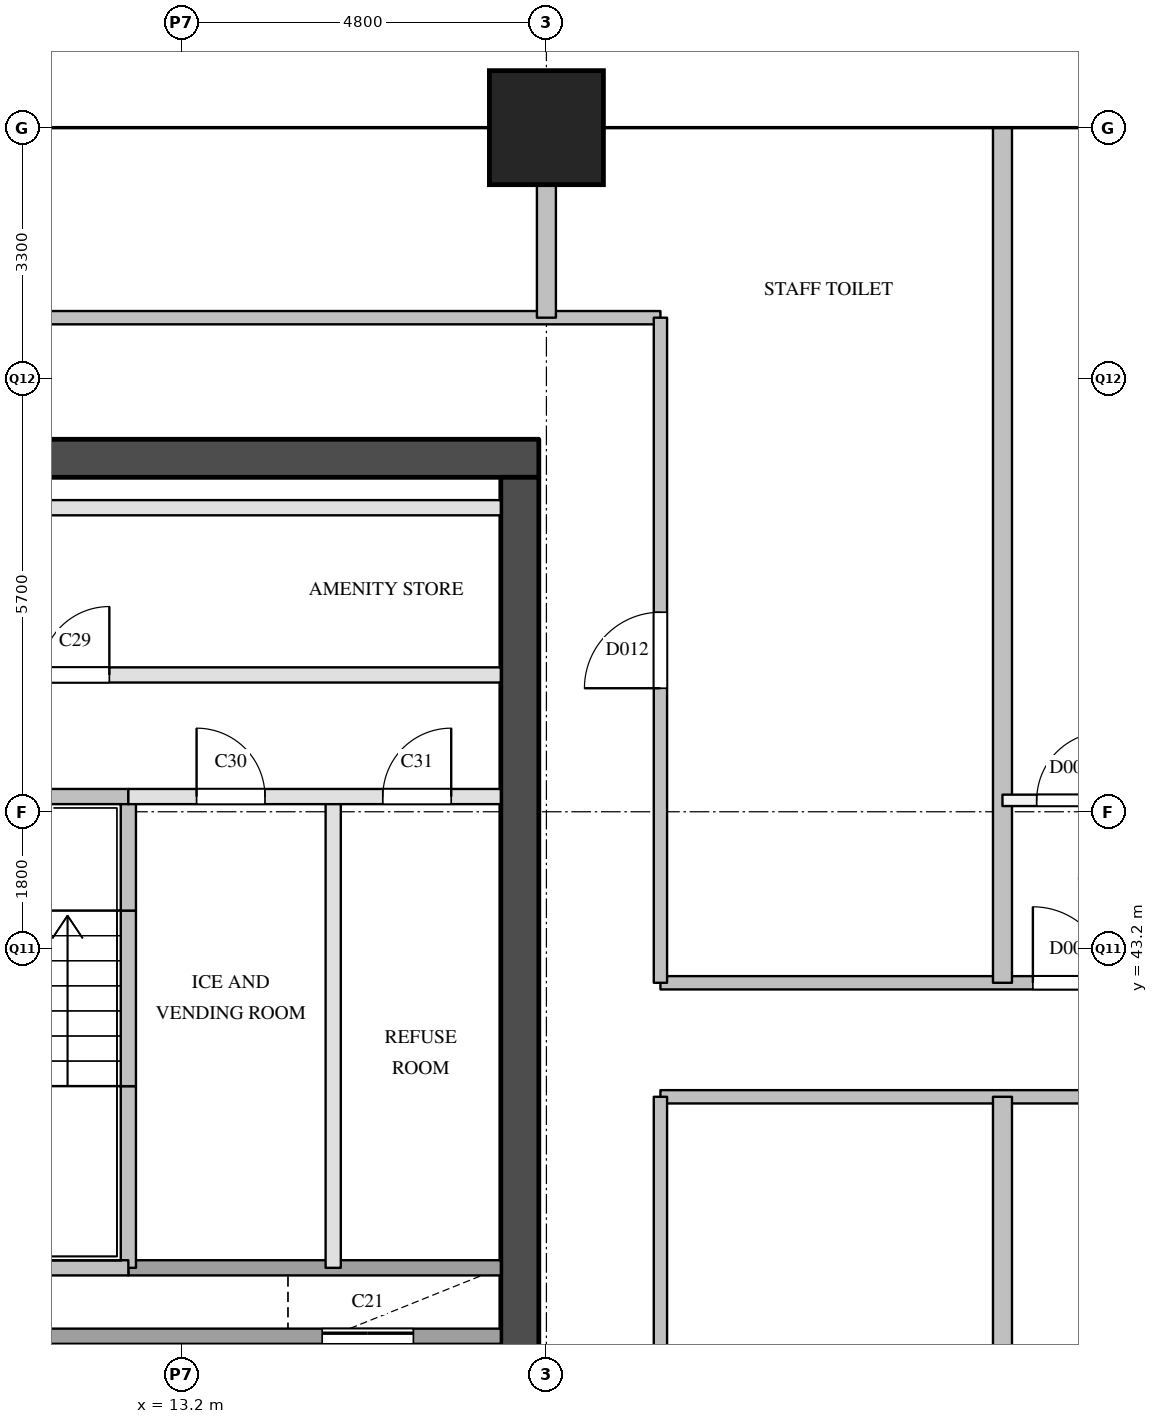
"""IFC4 building model, lengths in metres.
Left out: names, types, materials, properties, quantities, classifications, styles, units other than length and angle.
Written with IfcOpenShell. Run it as: python <this file> out.ifc"""

import sys

from ifc_helpers import new_model, si_unit, direction, frame, frame_2d, origin, origin_2d, place, context, subcontext, project, spatial, rectangle, extrude, element, fill, save


model = new_model("IFC4")
c1 = context("Model", 3, precision=1e-05, world=origin(), true_north=direction((0.0, 1.0)))
c2 = subcontext(c1, "Body", "Model", "MODEL_VIEW")
j1 = project(units=[si_unit("LENGTHUNIT", "METRE"), si_unit("PLANEANGLEUNIT", "RADIAN")], contexts=[c1])
p1 = place(None, origin())
s1 = spatial("IfcSite", under=j1, at=p1, CompositionType="ELEMENT")
p2 = place(p1, origin())
s2 = spatial("IfcBuilding", under=s1, at=p2, CompositionType="ELEMENT")
p3 = place(p2, frame((0.0, 0.0, 129.4)))
s3 = spatial("IfcBuildingStorey", under=s2, at=p3, CompositionType="ELEMENT", Elevation=129.4)
p4 = place(p3, frame((18.0, 54.0, 0.0), z_axis=(0.0, 0.0, 1.0), x_axis=(1.0, 0.0, 0.0)))
e1 = element("IfcColumn", 1, at=p4, inside=s3, PredefinedType="COLUMN", context=c2, shape_type="SweptSolid", body=[
    extrude(rectangle(XDim=1.5, YDim=1.5, at=origin_2d()), origin(), (0.0, 0.0, 1.0), 5.5),
])
p5 = place(p3, frame((5.7, 49.65, 0.0), z_axis=(0.0, 0.0, 1.0), x_axis=(1.0, 0.0, 0.0)))
e2 = element("IfcWall", 2, at=p5, inside=s3, PredefinedType="SHEAR", context=c2, shape_type="SweptSolid", body=[
    extrude(rectangle(XDim=12.2, YDim=0.5, at=frame_2d((6.1, 0.0))), origin(), (0.0, 0.0, 1.0), 5.2),
])
p6 = place(p3, frame((17.65, 29.1, 0.0), z_axis=(0.0, 0.0, 1.0), x_axis=(0.0, 1.0, 0.0)))
e3 = element("IfcWall", 3, at=p6, inside=s3, PredefinedType="SHEAR", context=c2, shape_type="SweptSolid", body=[
    extrude(rectangle(XDim=20.3, YDim=0.5, at=frame_2d((10.15, 0.0))), origin(), (0.0, 0.0, 1.0), 5.2),
])
p7 = place(p6, frame((1.25, 0.0, 0.0)))
e4 = element("IfcOpeningElement", 4, at=p7, cuts=e3, PredefinedType="OPENING", context=c2, shape_type="SweptSolid", body=[
    extrude(rectangle(XDim=0.7, YDim=2.1, at=frame_2d((0.35, 1.05))), frame((0.0, 0.26, 0.0), z_axis=(0.0, -1.0, 0.0), x_axis=(1.0, 0.0, 0.0)), (0.0, 0.0, 1.0), 0.52),
])
p8 = place(p6, frame((7.05, 0.0, 0.0)))
e5 = element("IfcOpeningElement", 5, at=p8, cuts=e3, PredefinedType="OPENING", context=c2, shape_type="SweptSolid", body=[
    extrude(rectangle(XDim=0.7, YDim=2.1, at=frame_2d((0.35, 1.05))), frame((0.0, 0.26, 0.0), z_axis=(0.0, -1.0, 0.0), x_axis=(1.0, 0.0, 0.0)), (0.0, 0.0, 1.0), 0.52),
])
p9 = place(p6, frame((3.6, 0.0, 0.0)))
e6 = element("IfcOpeningElement", 6, at=p9, cuts=e3, PredefinedType="OPENING", context=c2, shape_type="SweptSolid", body=[
    extrude(rectangle(XDim=1.8, YDim=2.1, at=frame_2d((0.9, 1.05))), frame((0.0, 0.26, 0.0), z_axis=(0.0, -1.0, 0.0), x_axis=(1.0, 0.0, 0.0)), (0.0, 0.0, 1.0), 0.52),
])
p10 = place(p3, frame((12.5, 39.0, 0.0), z_axis=(0.0, 0.0, 1.0), x_axis=(0.0, 1.0, 0.0)))
e7 = element("IfcWall", 7, at=p10, inside=s3, PredefinedType="SOLIDWALL", context=c2, shape_type="SweptSolid", body=[
    extrude(rectangle(XDim=2.39, YDim=0.2, at=frame_2d((1.195, 0.0))), origin(), (0.0, 0.0, 1.0), 5.2),
])
p11 = place(p3, frame((12.5, 41.39, 0.0), z_axis=(0.0, 0.0, 1.0), x_axis=(0.0, 1.0, 0.0)))
e8 = element("IfcWall", 8, at=p11, inside=s3, PredefinedType="SOLIDWALL", context=c2, shape_type="SweptSolid", body=[
    extrude(rectangle(XDim=2.31, YDim=0.2, at=frame_2d((1.155, 0.0))), origin(), (0.0, 0.0, 1.0), 5.2),
])
p12 = place(p3, frame((12.5, 43.7, 0.0), z_axis=(0.0, 0.0, 1.0), x_axis=(0.0, 1.0, 0.0)))
e9 = element("IfcWall", 9, at=p12, inside=s3, PredefinedType="SOLIDWALL", context=c2, shape_type="SweptSolid", body=[
    extrude(rectangle(XDim=1.5, YDim=0.2, at=frame_2d((0.75, 0.0))), origin(), (0.0, 0.0, 1.0), 5.2),
])
p13 = place(p3, frame((14.6, 34.9, 0.0), z_axis=(0.0, 0.0, 1.0), x_axis=(0.0, 1.0, 0.0)))
e10 = element("IfcWall", 10, at=p13, inside=s3, PredefinedType="SOLIDWALL", context=c2, shape_type="SweptSolid", body=[
    extrude(rectangle(XDim=3.2, YDim=0.2, at=frame_2d((1.6, 0.0))), origin(), (0.0, 0.0, 1.0), 5.2),
])
p14 = place(p3, frame((15.195, 39.0, 0.0), z_axis=(0.0, 0.0, 1.0), x_axis=(0.0, 1.0, 0.0)))
e11 = element("IfcWall", 11, at=p14, inside=s3, PredefinedType="PARTITIONING", context=c2, shape_type="SweptSolid", body=[
    extrude(rectangle(XDim=6.2, YDim=0.2, at=frame_2d((3.1, 0.0))), origin(), (0.0, 0.0, 1.0), 5.2),
])
p15 = place(p3, frame((16.7, 34.9, 0.0), z_axis=(0.0, 0.0, 1.0), x_axis=(0.0, 1.0, 0.0)))
e12 = element("IfcWall", 12, at=p15, inside=s3, PredefinedType="SOLIDWALL", context=c2, shape_type="SweptSolid", body=[
    extrude(rectangle(XDim=3.2, YDim=0.2, at=frame_2d((1.6, 0.0))), origin(), (0.0, 0.0, 1.0), 5.2),
])
p16 = place(p3, frame((6.2, 38.1, 0.0), z_axis=(0.0, 0.0, 1.0), x_axis=(1.0, 0.0, 0.0)))
e13 = element("IfcWall", 13, at=p16, inside=s3, PredefinedType="SOLIDWALL", context=c2, shape_type="SweptSolid", body=[
    extrude(rectangle(XDim=11.2, YDim=0.2, at=frame_2d((5.6, 0.0))), origin(), (0.0, 0.0, 1.0), 5.2),
])
p17 = place(p16, frame((8.85, 0.0, 0.0)))
e14 = element("IfcOpeningElement", 14, at=p17, cuts=e13, PredefinedType="OPENING", context=c2, shape_type="SweptSolid", body=[
    extrude(rectangle(XDim=1.2, YDim=2.1, at=frame_2d((0.6, 1.05))), frame((0.0, 0.11, 0.0), z_axis=(0.0, -1.0, 0.0), x_axis=(1.0, 0.0, 0.0)), (0.0, 0.0, 1.0), 0.22),
])
p18 = place(p3, frame((12.5, 39.0, 0.0), z_axis=(0.0, 0.0, 1.0), x_axis=(1.0, 0.0, 0.0)))
e15 = element("IfcWall", 15, at=p18, inside=s3, PredefinedType="SOLIDWALL", context=c2, shape_type="SweptSolid", body=[
    extrude(rectangle(XDim=4.9, YDim=0.2, at=frame_2d((2.45, 0.0))), origin(), (0.0, 0.0, 1.0), 5.2),
])
p19 = place(p3, frame((9.45, 39.0, 0.0), z_axis=(0.0, 0.0, 1.0), x_axis=(1.0, 0.0, 0.0)))
e16 = element("IfcWall", 16, at=p19, inside=s3, PredefinedType="SOLIDWALL", context=c2, shape_type="SweptSolid", body=[
    extrude(rectangle(XDim=3.05, YDim=0.2, at=frame_2d((1.525, 0.0))), origin(), (0.0, 0.0, 1.0), 5.2),
])
p20 = place(p3, frame((12.5, 45.2, 0.0), z_axis=(0.0, 0.0, 1.0), x_axis=(1.0, 0.0, 0.0)))
e17 = element("IfcWall", 17, at=p20, inside=s3, PredefinedType="PARTITIONING", context=c2, shape_type="SweptSolid", body=[
    extrude(rectangle(XDim=4.9, YDim=0.2, at=frame_2d((2.45, 0.0))), origin(), (0.0, 0.0, 1.0), 5.2),
])
p21 = place(p20, frame((0.897, 0.0, 0.0)))
e18 = element("IfcOpeningElement", 18, at=p21, cuts=e17, PredefinedType="OPENING", context=c2, shape_type="SweptSolid", body=[
    extrude(rectangle(XDim=0.9, YDim=2.1, at=frame_2d((0.45, 1.05))), frame((0.0, 0.11, 0.0), z_axis=(0.0, -1.0, 0.0), x_axis=(1.0, 0.0, 0.0)), (0.0, 0.0, 1.0), 0.22),
])
p22 = place(p20, frame((3.347, 0.0, 0.0)))
e19 = element("IfcOpeningElement", 19, at=p22, cuts=e17, PredefinedType="OPENING", context=c2, shape_type="SweptSolid", body=[
    extrude(rectangle(XDim=0.9, YDim=2.1, at=frame_2d((0.45, 1.05))), frame((0.0, 0.11, 0.0), z_axis=(0.0, -1.0, 0.0), x_axis=(1.0, 0.0, 0.0)), (0.0, 0.0, 1.0), 0.22),
])
p23 = place(p3, frame((9.45, 45.2, 0.0), z_axis=(0.0, 0.0, 1.0), x_axis=(1.0, 0.0, 0.0)))
e20 = element("IfcWall", 20, at=p23, inside=s3, PredefinedType="SOLIDWALL", context=c2, shape_type="SweptSolid", body=[
    extrude(rectangle(XDim=3.05, YDim=0.2, at=frame_2d((1.525, 0.0))), origin(), (0.0, 0.0, 1.0), 5.2),
])
p24 = place(p23, frame((0.925, 0.0, 0.0)))
e21 = element("IfcOpeningElement", 21, at=p24, cuts=e20, PredefinedType="OPENING", context=c2, shape_type="SweptSolid", body=[
    extrude(rectangle(XDim=1.1, YDim=2.1, at=frame_2d((0.55, 1.05))), frame((0.0, 0.11, 0.0), z_axis=(0.0, -1.0, 0.0), x_axis=(1.0, 0.0, 0.0)), (0.0, 0.0, 1.0), 0.22),
])
p25 = place(p3, frame((6.2, 46.8, 0.0), z_axis=(0.0, 0.0, 1.0), x_axis=(1.0, 0.0, 0.0)))
e22 = element("IfcWall", 22, at=p25, inside=s3, PredefinedType="PARTITIONING", context=c2, shape_type="SweptSolid", body=[
    extrude(rectangle(XDim=11.2, YDim=0.2, at=frame_2d((5.6, 0.0))), origin(), (0.0, 0.0, 1.0), 5.2),
])
p26 = place(p25, frame((5.15, 0.0, 0.0)))
e23 = element("IfcOpeningElement", 23, at=p26, cuts=e22, PredefinedType="OPENING", context=c2, shape_type="SweptSolid", body=[
    extrude(rectangle(XDim=0.9, YDim=2.1, at=frame_2d((0.45, 1.05))), frame((0.0, 0.11, 0.0), z_axis=(0.0, -1.0, 0.0), x_axis=(1.0, 0.0, 0.0)), (0.0, 0.0, 1.0), 0.22),
])
p27 = place(p3, frame((6.2, 49.0, 0.0), z_axis=(0.0, 0.0, 1.0), x_axis=(1.0, 0.0, 0.0)))
e24 = element("IfcWall", 24, at=p27, inside=s3, PredefinedType="PARTITIONING", context=c2, shape_type="SweptSolid", body=[
    extrude(rectangle(XDim=11.2, YDim=0.2, at=frame_2d((5.6, 0.0))), origin(), (0.0, 0.0, 1.0), 5.2),
])
p28 = place(p3, frame((19.5, 41.25, 0.0), z_axis=(0.0, 0.0, 1.0), x_axis=(1.0, 0.0, 0.0)))
e25 = element("IfcWall", 25, at=p28, inside=s3, PredefinedType="PARTITIONING", context=c2, shape_type="SweptSolid", body=[
    extrude(rectangle(XDim=15.0, YDim=0.175, at=frame_2d((7.5, 0.0))), origin(), (0.0, 0.0, 1.0), 4.2),
])
p29 = place(p3, frame((19.5, 42.75, 0.0), z_axis=(0.0, 0.0, 1.0), x_axis=(1.0, 0.0, 0.0)))
e26 = element("IfcWall", 26, at=p29, inside=s3, PredefinedType="PARTITIONING", context=c2, shape_type="SweptSolid", body=[
    extrude(rectangle(XDim=15.0, YDim=0.175, at=frame_2d((7.5, 0.0))), origin(), (0.0, 0.0, 1.0), 4.2),
])
p30 = place(p29, frame((4.9, 0.0, 0.0)))
e27 = element("IfcOpeningElement", 27, at=p30, cuts=e26, PredefinedType="OPENING", context=c2, shape_type="SweptSolid", body=[
    extrude(rectangle(XDim=1.0, YDim=2.1, at=frame_2d((0.5, 1.05))), frame((0.0, 0.097, 0.0), z_axis=(0.0, -1.0, 0.0), x_axis=(1.0, 0.0, 0.0)), (0.0, 0.0, 1.0), 0.195),
])
p31 = place(p3, frame((4.1, 51.5, 0.0), z_axis=(0.0, 0.0, 1.0), x_axis=(1.0, 0.0, 0.0)))
e28 = element("IfcWall", 28, at=p31, inside=s3, PredefinedType="PARTITIONING", context=c2, shape_type="SweptSolid", body=[
    extrude(rectangle(XDim=15.4, YDim=0.175, at=frame_2d((7.7, 0.0))), origin(), (0.0, 0.0, 1.0), 5.2),
])
p32 = place(p3, frame((19.5, 28.5, 0.0), z_axis=(0.0, 0.0, 1.0), x_axis=(0.0, 1.0, 0.0)))
e29 = element("IfcWall", 29, at=p32, inside=s3, PredefinedType="PARTITIONING", context=c2, shape_type="SweptSolid", body=[
    extrude(rectangle(XDim=12.75, YDim=0.175, at=frame_2d((6.375, 0.0))), origin(), (0.0, 0.0, 1.0), 5.2),
])
p33 = place(p32, frame((5.925, 0.0, 0.0)))
e30 = element("IfcOpeningElement", 30, at=p33, cuts=e29, PredefinedType="OPENING", context=c2, shape_type="SweptSolid", body=[
    extrude(rectangle(XDim=0.9, YDim=2.1, at=frame_2d((0.45, 1.05))), frame((0.0, 0.097, 0.0), z_axis=(0.0, -1.0, 0.0), x_axis=(1.0, 0.0, 0.0)), (0.0, 0.0, 1.0), 0.195),
])
p34 = place(p3, frame((19.5, 42.75, 0.0), z_axis=(0.0, 0.0, 1.0), x_axis=(0.0, 1.0, 0.0)))
e31 = element("IfcWall", 31, at=p34, inside=s3, PredefinedType="PARTITIONING", context=c2, shape_type="SweptSolid", body=[
    extrude(rectangle(XDim=8.75, YDim=0.175, at=frame_2d((4.375, 0.0))), origin(), (0.0, 0.0, 1.0), 5.2),
])
p35 = place(p34, frame((3.875, 0.0, 0.0)))
e32 = element("IfcOpeningElement", 32, at=p35, cuts=e31, PredefinedType="OPENING", context=c2, shape_type="SweptSolid", body=[
    extrude(rectangle(XDim=1.0, YDim=2.1, at=frame_2d((0.5, 1.05))), frame((0.0, 0.097, 0.0), z_axis=(0.0, -1.0, 0.0), x_axis=(1.0, 0.0, 0.0)), (0.0, 0.0, 1.0), 0.195),
])
p36 = place(p3, frame((24.0, 45.15, 0.0), z_axis=(0.0, 0.0, 1.0), x_axis=(1.0, 0.0, 0.0)))
e33 = element("IfcWall", 33, at=p36, inside=s3, PredefinedType="PARTITIONING", context=c2, shape_type="SweptSolid", body=[
    extrude(rectangle(XDim=1.8, YDim=0.15, at=frame_2d((0.9, 0.0))), origin(), (0.0, 0.0, 1.0), 5.2),
])
p37 = place(p36, frame((0.45, 0.0, 0.0)))
e34 = element("IfcOpeningElement", 34, at=p37, cuts=e33, PredefinedType="OPENING", context=c2, shape_type="SweptSolid", body=[
    extrude(rectangle(XDim=0.9, YDim=2.1, at=frame_2d((0.45, 1.05))), frame((0.0, 0.085, 0.0), z_axis=(0.0, -1.0, 0.0), x_axis=(1.0, 0.0, 0.0)), (0.0, 0.0, 1.0), 0.17),
])
p38 = place(p3, frame((18.0, 51.5, 0.0), z_axis=(0.0, 0.0, 1.0), x_axis=(0.0, 1.0, 0.0)))
e35 = element("IfcWall", 35, at=p38, inside=s3, PredefinedType="PARTITIONING", context=c2, shape_type="SweptSolid", body=[
    extrude(rectangle(XDim=2.5, YDim=0.25, at=frame_2d((1.25, 0.0))), origin(), (0.0, 0.0, 1.0), 5.2),
])
p39 = place(p3, frame((24.0, 27.0, 0.0), z_axis=(0.0, 0.0, 1.0), x_axis=(0.0, 1.0, 0.0)))
e36 = element("IfcWall", 36, at=p39, inside=s3, PredefinedType="PARTITIONING", context=c2, shape_type="SweptSolid", body=[
    extrude(rectangle(XDim=14.25, YDim=0.25, at=frame_2d((7.125, 0.0))), origin(), (0.0, 0.0, 1.0), 4.2),
])
p40 = place(p3, frame((24.0, 42.75, 0.0), z_axis=(0.0, 0.0, 1.0), x_axis=(0.0, 1.0, 0.0)))
e37 = element("IfcWall", 37, at=p40, inside=s3, PredefinedType="PARTITIONING", context=c2, shape_type="SweptSolid", body=[
    extrude(rectangle(XDim=11.25, YDim=0.25, at=frame_2d((5.625, 0.0))), origin(), (0.0, 0.0, 1.0), 4.2),
])
p41 = place(p17, origin())
e38 = element("IfcDoor", 38, at=p41, inside=s3, OperationType="SLIDING_TO_LEFT", PredefinedType="DOOR", context=c2, shape_type="SweptSolid", body=[
    extrude(rectangle(XDim=1.2, YDim=2.1, at=frame_2d((0.6, 1.05))), frame((0.0, 0.025, 0.0), z_axis=(0.0, -1.0, 0.0), x_axis=(1.0, 0.0, 0.0)), (0.0, 0.0, 1.0), 0.05),
])
fill(e14, e38)
p42 = place(p26, origin())
e39 = element("IfcDoor", 39, at=p42, inside=s3, OperationType="SINGLE_SWING_RIGHT", PredefinedType="DOOR", context=c2, shape_type="SweptSolid", body=[
    extrude(rectangle(XDim=0.9, YDim=2.1, at=frame_2d((0.45, 1.05))), frame((0.0, 0.025, 0.0), z_axis=(0.0, -1.0, 0.0), x_axis=(1.0, 0.0, 0.0)), (0.0, 0.0, 1.0), 0.05),
])
fill(e23, e39)
p43 = place(p21, origin())
e40 = element("IfcDoor", 40, at=p43, inside=s3, OperationType="SINGLE_SWING_LEFT", PredefinedType="DOOR", context=c2, shape_type="SweptSolid", body=[
    extrude(rectangle(XDim=0.9, YDim=2.1, at=frame_2d((0.45, 1.05))), frame((0.0, 0.025, 0.0), z_axis=(0.0, -1.0, 0.0), x_axis=(1.0, 0.0, 0.0)), (0.0, 0.0, 1.0), 0.05),
])
fill(e18, e40)
p44 = place(p22, origin())
e41 = element("IfcDoor", 41, at=p44, inside=s3, OperationType="SINGLE_SWING_RIGHT", PredefinedType="DOOR", context=c2, shape_type="SweptSolid", body=[
    extrude(rectangle(XDim=0.9, YDim=2.1, at=frame_2d((0.45, 1.05))), frame((0.0, 0.025, 0.0), z_axis=(0.0, -1.0, 0.0), x_axis=(1.0, 0.0, 0.0)), (0.0, 0.0, 1.0), 0.05),
])
fill(e19, e41)
p45 = place(p30, origin())
e42 = element("IfcDoor", 42, at=p45, inside=s3, OperationType="SINGLE_SWING_LEFT", PredefinedType="DOOR", context=c2, shape_type="SweptSolid", body=[
    extrude(rectangle(XDim=1.0, YDim=2.1, at=frame_2d((0.5, 1.05))), frame((0.0, 0.025, 0.0), z_axis=(0.0, -1.0, 0.0), x_axis=(1.0, 0.0, 0.0)), (0.0, 0.0, 1.0), 0.05),
])
fill(e27, e42)
p46 = place(p37, origin())
e43 = element("IfcDoor", 43, at=p46, inside=s3, OperationType="SINGLE_SWING_RIGHT", PredefinedType="DOOR", context=c2, shape_type="SweptSolid", body=[
    extrude(rectangle(XDim=0.9, YDim=2.1, at=frame_2d((0.45, 1.05))), frame((0.0, 0.025, 0.0), z_axis=(0.0, -1.0, 0.0), x_axis=(1.0, 0.0, 0.0)), (0.0, 0.0, 1.0), 0.05),
])
fill(e34, e43)
p47 = place(p35, origin())
e44 = element("IfcDoor", 44, at=p47, inside=s3, OperationType="SINGLE_SWING_LEFT", PredefinedType="DOOR", context=c2, shape_type="SweptSolid", body=[
    extrude(rectangle(XDim=1.0, YDim=2.1, at=frame_2d((0.5, 1.05))), frame((0.0, 0.025, 0.0), z_axis=(0.0, -1.0, 0.0), x_axis=(1.0, 0.0, 0.0)), (0.0, 0.0, 1.0), 0.05),
])
fill(e32, e44)
save(model, sys.argv[1])
